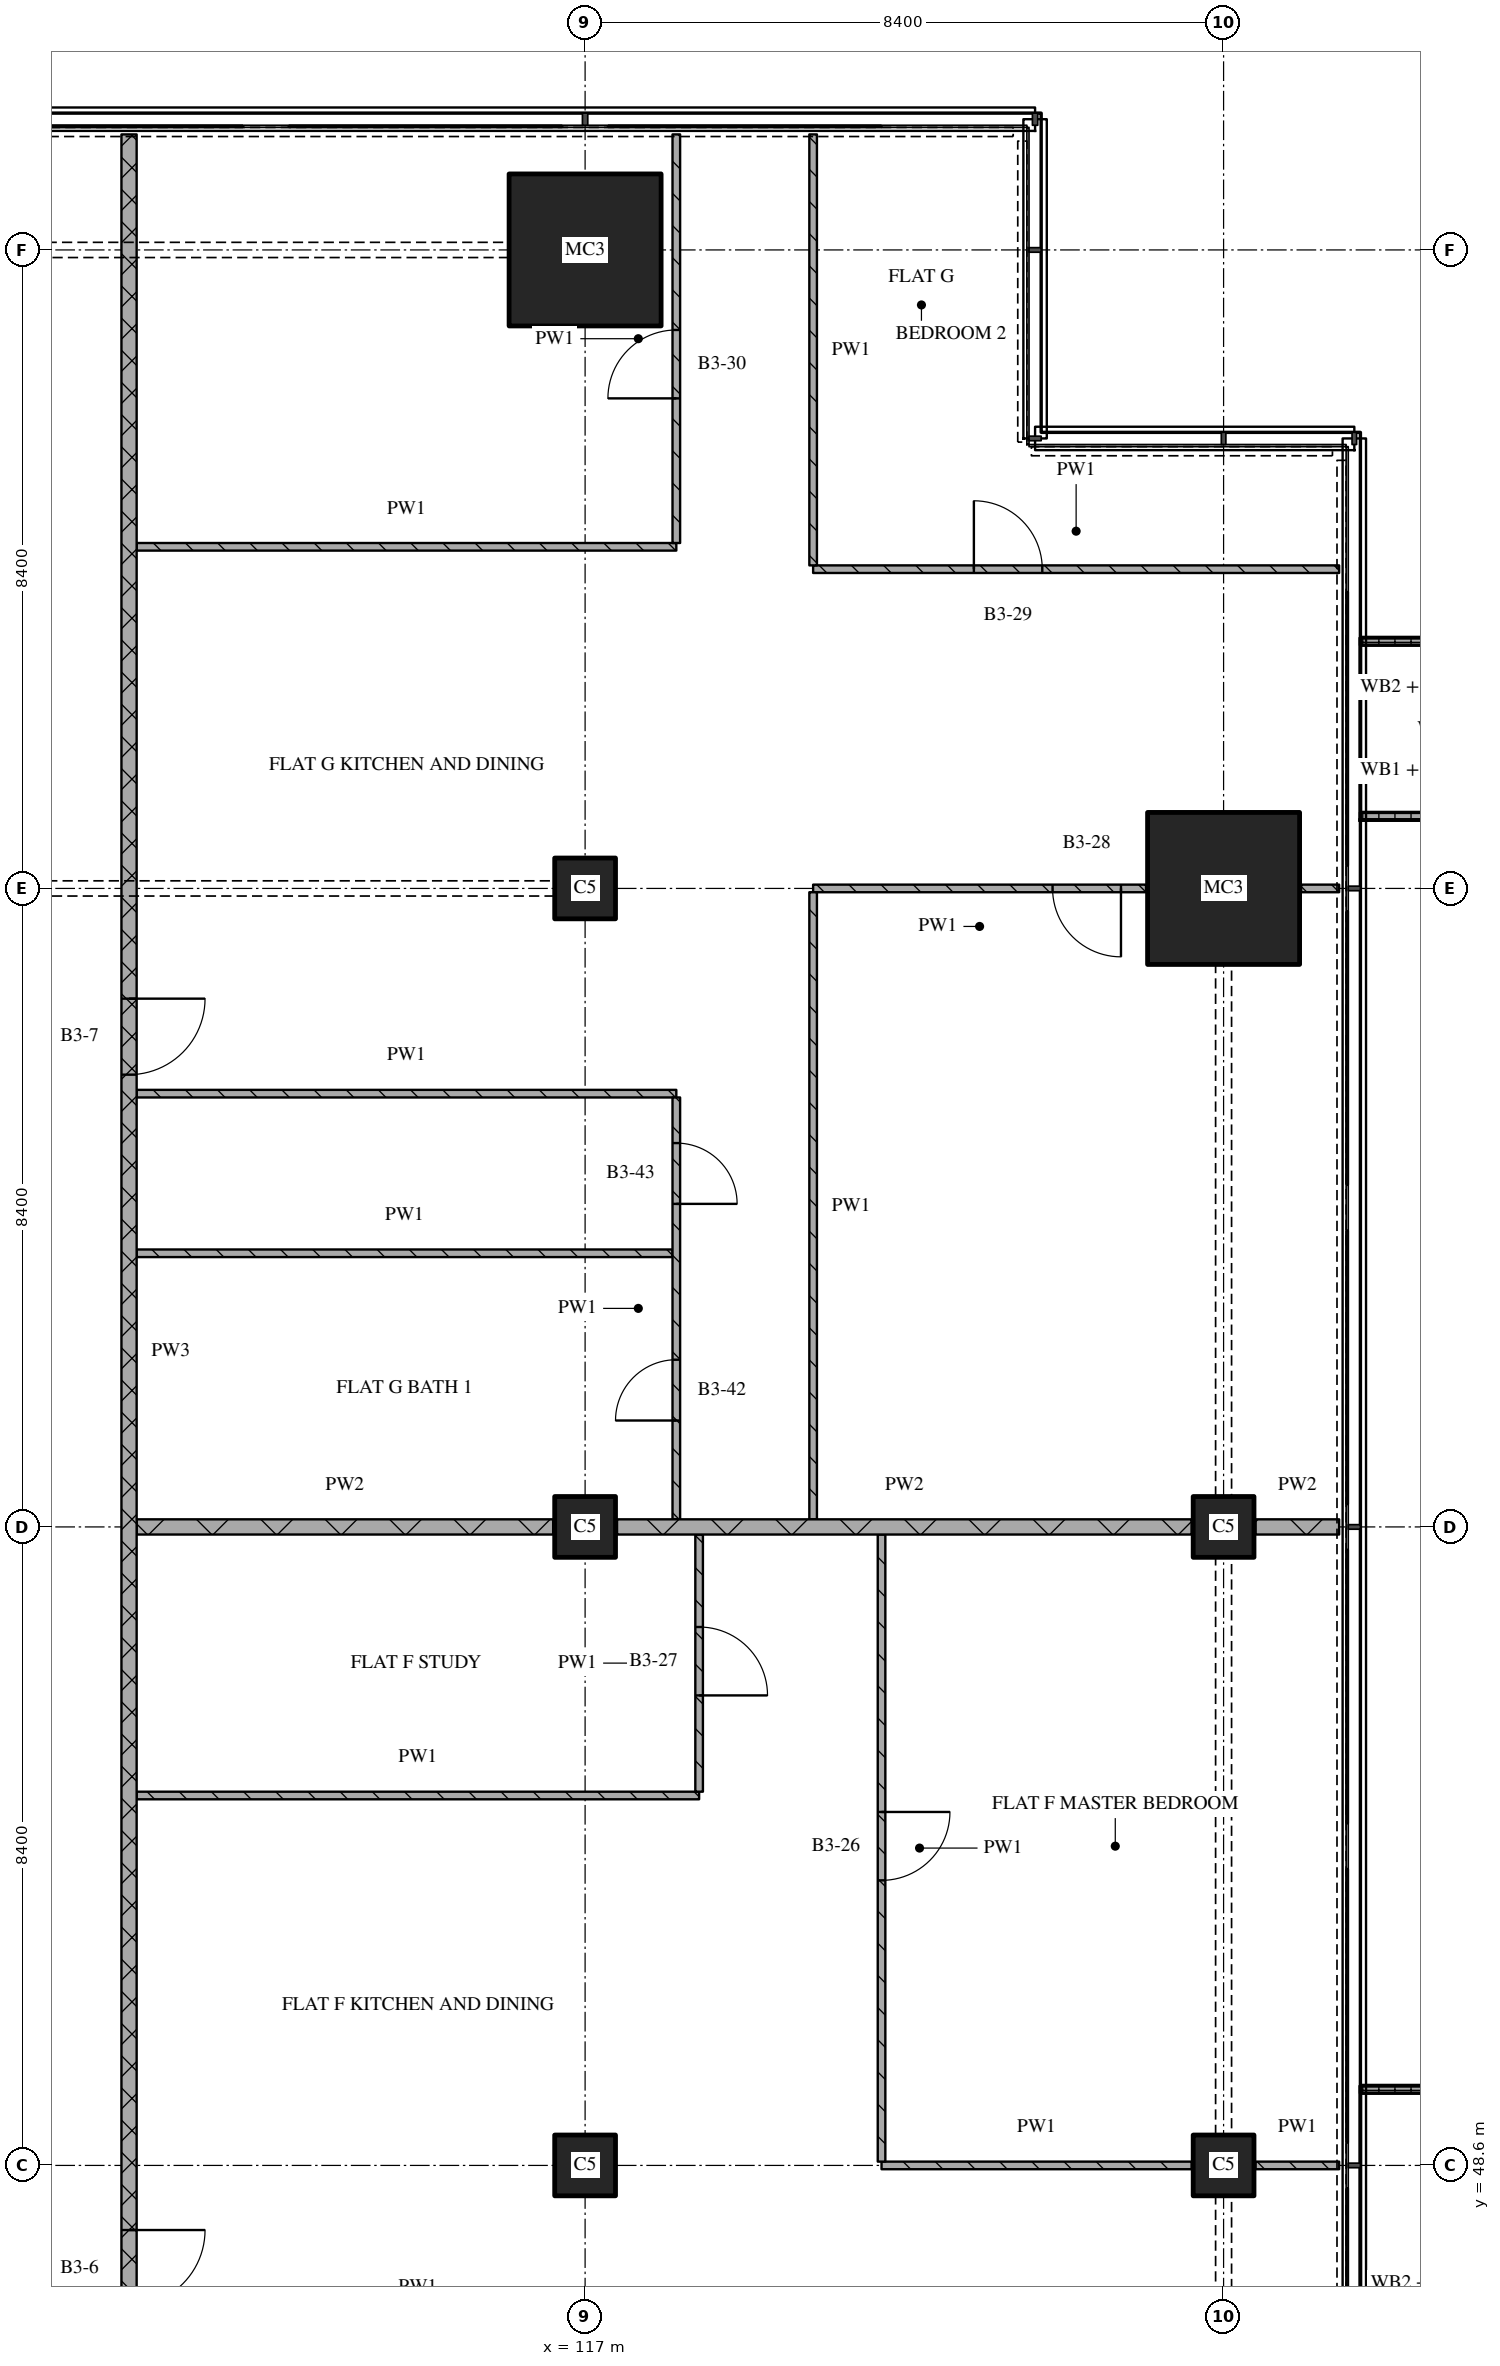
"""IFC4 building model, lengths in metres.
Left out: names, types, materials, properties, quantities, classifications, styles, units other than length and angle.
Written with IfcOpenShell. Run it as: python <this file> out.ifc"""

import sys

from ifc_helpers import new_model, si_unit, direction, frame, frame_2d, origin, origin_2d, place, context, subcontext, project, spatial, polyline, rectangle, outline, extrude, element, fill, save


model = new_model("IFC4")
c1 = context("Model", 3, precision=1e-05, world=origin(), true_north=direction((0.0, 1.0)))
c2 = subcontext(c1, "Body", "Model", "MODEL_VIEW")
j1 = project(units=[si_unit("LENGTHUNIT", "METRE"), si_unit("PLANEANGLEUNIT", "RADIAN")], contexts=[c1])
p1 = place(None, origin())
s1 = spatial("IfcSite", under=j1, at=p1, CompositionType="ELEMENT")
p2 = place(p1, origin())
s2 = spatial("IfcBuilding", under=s1, at=p2, CompositionType="ELEMENT")
p3 = place(p2, frame((0.0, 0.0, 124.05)))
s3 = spatial("IfcBuildingStorey", under=s2, at=p3, CompositionType="ELEMENT", Elevation=124.05)
for number, where, z_axis, x_axis in (
    (1, (117.0, 48.6, 0.0), (0.0, 0.0, 1.0), (1.0, 0.0, 0.0)),
    (2, (117.0, 57.0, 0.0), (0.0, 0.0, 1.0), (1.0, 0.0, 0.0)),
    (3, (117.0, 65.4, 0.0), (0.0, 0.0, 1.0), (1.0, 0.0, 0.0)),
):
    element("IfcColumn", number, at=place(p3, frame(where, z_axis=z_axis, x_axis=x_axis)), inside=s3, PredefinedType="COLUMN", context=c2, shape_type="SweptSolid", body=[
        extrude(rectangle(XDim=0.8, YDim=0.8, at=origin_2d()), origin(), (0.0, 0.0, 1.0), 3.6),
    ])
p4 = place(p3, frame((117.0, 73.8, 0.0), z_axis=(0.0, 0.0, 1.0), x_axis=(1.0, 0.0, 0.0)))
e4 = element("IfcColumn", 4, at=p4, inside=s3, PredefinedType="COLUMN", context=c2, shape_type="SweptSolid", body=[
    extrude(rectangle(XDim=2.0, YDim=2.0, at=origin_2d()), origin(), (0.0, 0.0, 1.0), 3.6),
])
for number, where, z_axis, x_axis in (
    (5, (125.4, 48.6, 0.0), (0.0, 0.0, 1.0), (1.0, 0.0, 0.0)),
    (6, (125.4, 57.0, 0.0), (0.0, 0.0, 1.0), (1.0, 0.0, 0.0)),
):
    element("IfcColumn", number, at=place(p3, frame(where, z_axis=z_axis, x_axis=x_axis)), inside=s3, PredefinedType="COLUMN", context=c2, shape_type="SweptSolid", body=[
        extrude(rectangle(XDim=0.8, YDim=0.8, at=origin_2d()), origin(), (0.0, 0.0, 1.0), 3.6),
    ])
p5 = place(p3, frame((125.4, 65.4, 0.0), z_axis=(0.0, 0.0, 1.0), x_axis=(1.0, 0.0, 0.0)))
e7 = element("IfcColumn", 7, at=p5, inside=s3, PredefinedType="COLUMN", context=c2, shape_type="SweptSolid", body=[
    extrude(rectangle(XDim=2.0, YDim=2.0, at=origin_2d()), origin(), (0.0, 0.0, 1.0), 3.6),
])
p6 = place(p3, origin())
e8 = element("IfcWall", 8, at=p6, inside=s3, PredefinedType="SOLIDWALL", context=c2, shape_type="SweptSolid", body=[
    extrude(outline(polyline([(127.2, 43.35), (127.2, 43.45), (128.967, 43.45), (128.967, 49.55), (127.2, 49.55), (127.2, 49.65), (129.067, 49.65), (129.067, 43.35), (127.2, 43.35)])), origin(), (0.0, 0.0, 1.0), 1.0),
])
p7 = place(p3, origin())
e9 = element("IfcWall", 9, at=p7, inside=s3, PredefinedType="SOLIDWALL", context=c2, shape_type="SweptSolid", body=[
    extrude(outline(polyline([(127.2, 66.3), (127.2, 66.4), (128.7, 66.4), (128.7, 68.6), (127.2, 68.6), (127.2, 68.7), (128.8, 68.7), (128.8, 66.3), (127.2, 66.3)])), origin(), (0.0, 0.0, 1.0), 1.0),
])
p8 = place(p3, frame((120.9, 48.6, 0.0), z_axis=(0.0, 0.0, 1.0), x_axis=(1.0, 0.0, 0.0)))
e10 = element("IfcWall", 10, at=p8, inside=s3, PredefinedType="PARTITIONING", context=c2, shape_type="SweptSolid", body=[
    extrude(rectangle(XDim=4.08, YDim=0.1, at=frame_2d((2.04, 0.0))), origin(), (0.0, 0.0, 1.0), 3.32),
])
p9 = place(p3, frame((125.82, 48.6, 0.0), z_axis=(0.0, 0.0, 1.0), x_axis=(1.0, 0.0, 0.0)))
e11 = element("IfcWall", 11, at=p9, inside=s3, PredefinedType="PARTITIONING", context=c2, shape_type="SweptSolid", body=[
    extrude(rectangle(XDim=1.1, YDim=0.1, at=frame_2d((0.55, 0.0))), origin(), (0.0, 0.0, 1.0), 3.32),
])
p10 = place(p3, frame((111.1, 53.467, 0.0), z_axis=(0.0, 0.0, 1.0), x_axis=(1.0, 0.0, 0.0)))
e12 = element("IfcWall", 12, at=p10, inside=s3, PredefinedType="PARTITIONING", context=c2, shape_type="SweptSolid", body=[
    extrude(rectangle(XDim=7.4, YDim=0.1, at=frame_2d((3.7, 0.0))), origin(), (0.0, 0.0, 1.0), 3.32),
])
p11 = place(p3, frame((111.1, 57.0, 0.0), z_axis=(0.0, 0.0, 1.0), x_axis=(1.0, 0.0, 0.0)))
e13 = element("IfcWall", 13, at=p11, inside=s3, PredefinedType="PARTITIONING", context=c2, shape_type="SweptSolid", body=[
    extrude(rectangle(XDim=5.48, YDim=0.2, at=frame_2d((2.74, 0.0))), origin(), (0.0, 0.0, 1.0), 3.32),
])
p12 = place(p3, frame((117.42, 57.0, 0.0), z_axis=(0.0, 0.0, 1.0), x_axis=(1.0, 0.0, 0.0)))
e14 = element("IfcWall", 14, at=p12, inside=s3, PredefinedType="PARTITIONING", context=c2, shape_type="SweptSolid", body=[
    extrude(rectangle(XDim=7.56, YDim=0.2, at=frame_2d((3.78, 0.0))), origin(), (0.0, 0.0, 1.0), 3.32),
])
p13 = place(p3, frame((125.82, 57.0, 0.0), z_axis=(0.0, 0.0, 1.0), x_axis=(1.0, 0.0, 0.0)))
e15 = element("IfcWall", 15, at=p13, inside=s3, PredefinedType="PARTITIONING", context=c2, shape_type="SweptSolid", body=[
    extrude(rectangle(XDim=1.1, YDim=0.2, at=frame_2d((0.55, 0.0))), origin(), (0.0, 0.0, 1.0), 3.32),
])
p14 = place(p3, frame((111.1, 60.6, 0.0), z_axis=(0.0, 0.0, 1.0), x_axis=(1.0, 0.0, 0.0)))
e16 = element("IfcWall", 16, at=p14, inside=s3, PredefinedType="PARTITIONING", context=c2, shape_type="SweptSolid", body=[
    extrude(rectangle(XDim=7.05, YDim=0.1, at=frame_2d((3.525, 0.0))), origin(), (0.0, 0.0, 1.0), 3.32),
])
p15 = place(p3, frame((111.1, 62.7, 0.0), z_axis=(0.0, 0.0, 1.0), x_axis=(1.0, 0.0, 0.0)))
e17 = element("IfcWall", 17, at=p15, inside=s3, PredefinedType="PARTITIONING", context=c2, shape_type="SweptSolid", body=[
    extrude(rectangle(XDim=7.1, YDim=0.1, at=frame_2d((3.55, 0.0))), origin(), (0.0, 0.0, 1.0), 3.32),
])
p16 = place(p3, frame((124.38, 65.4, 0.0), z_axis=(0.0, 0.0, 1.0), x_axis=(-1.0, 0.0, 0.0)))
e18 = element("IfcWall", 18, at=p16, inside=s3, PredefinedType="PARTITIONING", context=c2, shape_type="SweptSolid", body=[
    extrude(rectangle(XDim=4.38, YDim=0.1, at=frame_2d((2.19, 0.0))), origin(), (0.0, 0.0, 1.0), 3.32),
])
p17 = place(p16, frame((0.33, 0.0, 0.0)))
e19 = element("IfcOpeningElement", 19, at=p17, cuts=e18, PredefinedType="OPENING", context=c2, shape_type="SweptSolid", body=[
    extrude(rectangle(XDim=0.9, YDim=2.1, at=frame_2d((0.45, 1.05))), frame((0.0, 0.06, 0.0), z_axis=(0.0, -1.0, 0.0), x_axis=(1.0, 0.0, 0.0)), (0.0, 0.0, 1.0), 0.12),
])
p18 = place(p3, frame((126.42, 65.4, 0.0), z_axis=(0.0, 0.0, 1.0), x_axis=(1.0, 0.0, 0.0)))
e20 = element("IfcWall", 20, at=p18, inside=s3, PredefinedType="PARTITIONING", context=c2, shape_type="SweptSolid", body=[
    extrude(rectangle(XDim=0.5, YDim=0.1, at=frame_2d((0.25, 0.0))), origin(), (0.0, 0.0, 1.0), 3.32),
])
p19 = place(p3, frame((120.0, 69.6, 0.0), z_axis=(0.0, 0.0, 1.0), x_axis=(1.0, 0.0, 0.0)))
e21 = element("IfcWall", 21, at=p19, inside=s3, PredefinedType="PARTITIONING", context=c2, shape_type="SweptSolid", body=[
    extrude(rectangle(XDim=6.92, YDim=0.1, at=frame_2d((3.46, 0.0))), origin(), (0.0, 0.0, 1.0), 3.32),
])
p20 = place(p19, frame((2.115, 0.0, 0.0)))
e22 = element("IfcOpeningElement", 22, at=p20, cuts=e21, PredefinedType="OPENING", context=c2, shape_type="SweptSolid", body=[
    extrude(rectangle(XDim=0.9, YDim=2.1, at=frame_2d((0.45, 1.05))), frame((0.0, 0.06, 0.0), z_axis=(0.0, -1.0, 0.0), x_axis=(1.0, 0.0, 0.0)), (0.0, 0.0, 1.0), 0.12),
])
p21 = place(p3, frame((111.1, 69.894, 0.0), z_axis=(0.0, 0.0, 1.0), x_axis=(1.0, 0.0, 0.0)))
e23 = element("IfcWall", 23, at=p21, inside=s3, PredefinedType="PARTITIONING", context=c2, shape_type="SweptSolid", body=[
    extrude(rectangle(XDim=7.1, YDim=0.1, at=frame_2d((3.55, 0.0))), origin(), (0.0, 0.0, 1.0), 3.32),
])
p22 = place(p3, frame((111.0, 75.32, 0.0), z_axis=(0.0, 0.0, 1.0), x_axis=(0.0, -1.0, 0.0)))
e24 = element("IfcWall", 24, at=p22, inside=s3, PredefinedType="PARTITIONING", context=c2, shape_type="SweptSolid", body=[
    extrude(rectangle(XDim=32.02, YDim=0.2, at=frame_2d((16.01, 0.0))), origin(), (0.0, 0.0, 1.0), 3.32),
])
p23 = place(p22, frame((11.37, 0.0, 0.0)))
e25 = element("IfcOpeningElement", 25, at=p23, cuts=e24, PredefinedType="OPENING", context=c2, shape_type="SweptSolid", body=[
    extrude(rectangle(XDim=1.0, YDim=2.1, at=frame_2d((0.5, 1.05))), frame((0.0, 0.11, 0.0), z_axis=(0.0, -1.0, 0.0), x_axis=(1.0, 0.0, 0.0)), (0.0, 0.0, 1.0), 0.22),
])
p24 = place(p22, frame((27.57, 0.0, 0.0)))
e26 = element("IfcOpeningElement", 26, at=p24, cuts=e24, PredefinedType="OPENING", context=c2, shape_type="SweptSolid", body=[
    extrude(rectangle(XDim=1.0, YDim=2.1, at=frame_2d((0.5, 1.05))), frame((0.0, 0.11, 0.0), z_axis=(0.0, -1.0, 0.0), x_axis=(1.0, 0.0, 0.0)), (0.0, 0.0, 1.0), 0.22),
])
p25 = place(p3, frame((118.2, 57.1, 0.0), z_axis=(0.0, 0.0, 1.0), x_axis=(0.0, 1.0, 0.0)))
e27 = element("IfcWall", 27, at=p25, inside=s3, PredefinedType="PARTITIONING", context=c2, shape_type="SweptSolid", body=[
    extrude(rectangle(XDim=5.55, YDim=0.1, at=frame_2d((2.775, 0.0))), origin(), (0.0, 0.0, 1.0), 3.32),
])
p26 = place(p25, frame((1.3, 0.0, 0.0)))
e28 = element("IfcOpeningElement", 28, at=p26, cuts=e27, PredefinedType="OPENING", context=c2, shape_type="SweptSolid", body=[
    extrude(rectangle(XDim=0.8, YDim=2.1, at=frame_2d((0.4, 1.05))), frame((0.0, 0.06, 0.0), z_axis=(0.0, -1.0, 0.0), x_axis=(1.0, 0.0, 0.0)), (0.0, 0.0, 1.0), 0.12),
])
p27 = place(p25, frame((4.15, 0.0, 0.0)))
e29 = element("IfcOpeningElement", 29, at=p27, cuts=e27, PredefinedType="OPENING", context=c2, shape_type="SweptSolid", body=[
    extrude(rectangle(XDim=0.8, YDim=2.1, at=frame_2d((0.4, 1.05))), frame((0.0, 0.06, 0.0), z_axis=(0.0, -1.0, 0.0), x_axis=(1.0, 0.0, 0.0)), (0.0, 0.0, 1.0), 0.12),
])
p28 = place(p3, frame((118.2, 69.944, 0.0), z_axis=(0.0, 0.0, 1.0), x_axis=(0.0, 1.0, 0.0)))
e30 = element("IfcWall", 30, at=p28, inside=s3, PredefinedType="PARTITIONING", context=c2, shape_type="SweptSolid", body=[
    extrude(rectangle(XDim=5.376, YDim=0.1, at=frame_2d((2.688, 0.0))), origin(), (0.0, 0.0, 1.0), 3.32),
])
p29 = place(p28, frame((1.903, 0.0, 0.0)))
e31 = element("IfcOpeningElement", 31, at=p29, cuts=e30, PredefinedType="OPENING", context=c2, shape_type="SweptSolid", body=[
    extrude(rectangle(XDim=0.9, YDim=2.1, at=frame_2d((0.45, 1.05))), frame((0.0, 0.06, 0.0), z_axis=(0.0, -1.0, 0.0), x_axis=(1.0, 0.0, 0.0)), (0.0, 0.0, 1.0), 0.12),
])
p30 = place(p3, frame((118.5, 53.517, 0.0), z_axis=(0.0, 0.0, 1.0), x_axis=(0.0, 1.0, 0.0)))
e32 = element("IfcWall", 32, at=p30, inside=s3, PredefinedType="PARTITIONING", context=c2, shape_type="SweptSolid", body=[
    extrude(rectangle(XDim=3.383, YDim=0.1, at=frame_2d((1.692, 0.0))), origin(), (0.0, 0.0, 1.0), 3.32),
])
p31 = place(p30, frame((1.267, 0.0, 0.0)))
e33 = element("IfcOpeningElement", 33, at=p31, cuts=e32, PredefinedType="OPENING", context=c2, shape_type="SweptSolid", body=[
    extrude(rectangle(XDim=0.9, YDim=2.1, at=frame_2d((0.45, 1.05))), frame((0.0, 0.06, 0.0), z_axis=(0.0, -1.0, 0.0), x_axis=(1.0, 0.0, 0.0)), (0.0, 0.0, 1.0), 0.12),
])
p32 = place(p3, frame((120.0, 65.35, 0.0), z_axis=(0.0, 0.0, 1.0), x_axis=(0.0, -1.0, 0.0)))
e34 = element("IfcWall", 34, at=p32, inside=s3, PredefinedType="PARTITIONING", context=c2, shape_type="SweptSolid", body=[
    extrude(rectangle(XDim=8.25, YDim=0.1, at=frame_2d((4.125, 0.0))), origin(), (0.0, 0.0, 1.0), 3.32),
])
p33 = place(p3, frame((120.0, 75.32, 0.0), z_axis=(0.0, 0.0, 1.0), x_axis=(0.0, -1.0, 0.0)))
e35 = element("IfcWall", 35, at=p33, inside=s3, PredefinedType="PARTITIONING", context=c2, shape_type="SweptSolid", body=[
    extrude(rectangle(XDim=5.67, YDim=0.1, at=frame_2d((2.835, 0.0))), origin(), (0.0, 0.0, 1.0), 3.32),
])
p34 = place(p3, frame((120.9, 56.9, 0.0), z_axis=(0.0, 0.0, 1.0), x_axis=(0.0, -1.0, 0.0)))
e36 = element("IfcWall", 36, at=p34, inside=s3, PredefinedType="PARTITIONING", context=c2, shape_type="SweptSolid", body=[
    extrude(rectangle(XDim=8.25, YDim=0.1, at=frame_2d((4.125, 0.0))), origin(), (0.0, 0.0, 1.0), 3.32),
])
p35 = place(p34, frame((3.65, 0.0, 0.0)))
e37 = element("IfcOpeningElement", 37, at=p35, cuts=e36, PredefinedType="OPENING", context=c2, shape_type="SweptSolid", body=[
    extrude(rectangle(XDim=0.9, YDim=2.1, at=frame_2d((0.45, 1.05))), frame((0.0, 0.06, 0.0), z_axis=(0.0, -1.0, 0.0), x_axis=(1.0, 0.0, 0.0)), (0.0, 0.0, 1.0), 0.12),
])
p36 = place(p17, origin())
e38 = element("IfcDoor", 38, at=p36, inside=s3, OperationType="SINGLE_SWING_LEFT", PredefinedType="DOOR", context=c2, shape_type="SweptSolid", body=[
    extrude(rectangle(XDim=0.9, YDim=2.1, at=frame_2d((0.45, 1.05))), frame((0.0, 0.025, 0.0), z_axis=(0.0, -1.0, 0.0), x_axis=(1.0, 0.0, 0.0)), (0.0, 0.0, 1.0), 0.05),
])
fill(e19, e38)
p37 = place(p20, origin())
e39 = element("IfcDoor", 39, at=p37, inside=s3, OperationType="SINGLE_SWING_LEFT", PredefinedType="DOOR", context=c2, shape_type="SweptSolid", body=[
    extrude(rectangle(XDim=0.9, YDim=2.1, at=frame_2d((0.45, 1.05))), frame((0.0, 0.025, 0.0), z_axis=(0.0, -1.0, 0.0), x_axis=(1.0, 0.0, 0.0)), (0.0, 0.0, 1.0), 0.05),
])
fill(e22, e39)
p38 = place(p23, origin())
e40 = element("IfcDoor", 40, at=p38, inside=s3, OperationType="SINGLE_SWING_LEFT", PredefinedType="DOOR", context=c2, shape_type="SweptSolid", body=[
    extrude(rectangle(XDim=1.0, YDim=2.1, at=frame_2d((0.5, 1.05))), frame((0.0, 0.025, 0.0), z_axis=(0.0, -1.0, 0.0), x_axis=(1.0, 0.0, 0.0)), (0.0, 0.0, 1.0), 0.05),
])
fill(e25, e40)
p39 = place(p24, origin())
e41 = element("IfcDoor", 41, at=p39, inside=s3, OperationType="SINGLE_SWING_LEFT", PredefinedType="DOOR", context=c2, shape_type="SweptSolid", body=[
    extrude(rectangle(XDim=1.0, YDim=2.1, at=frame_2d((0.5, 1.05))), frame((0.0, 0.025, 0.0), z_axis=(0.0, -1.0, 0.0), x_axis=(1.0, 0.0, 0.0)), (0.0, 0.0, 1.0), 0.05),
])
fill(e26, e41)
p40 = place(p26, origin())
e42 = element("IfcDoor", 42, at=p40, inside=s3, OperationType="SINGLE_SWING_LEFT", PredefinedType="DOOR", context=c2, shape_type="SweptSolid", body=[
    extrude(rectangle(XDim=0.8, YDim=2.1, at=frame_2d((0.4, 1.05))), frame((0.0, 0.025, 0.0), z_axis=(0.0, -1.0, 0.0), x_axis=(1.0, 0.0, 0.0)), (0.0, 0.0, 1.0), 0.05),
])
fill(e28, e42)
p41 = place(p27, origin())
e43 = element("IfcDoor", 43, at=p41, inside=s3, OperationType="SINGLE_SWING_RIGHT", PredefinedType="DOOR", context=c2, shape_type="SweptSolid", body=[
    extrude(rectangle(XDim=0.8, YDim=2.1, at=frame_2d((0.4, 1.05))), frame((0.0, 0.025, 0.0), z_axis=(0.0, -1.0, 0.0), x_axis=(1.0, 0.0, 0.0)), (0.0, 0.0, 1.0), 0.05),
])
fill(e29, e43)
p42 = place(p29, origin())
e44 = element("IfcDoor", 44, at=p42, inside=s3, OperationType="SINGLE_SWING_LEFT", PredefinedType="DOOR", context=c2, shape_type="SweptSolid", body=[
    extrude(rectangle(XDim=0.9, YDim=2.1, at=frame_2d((0.45, 1.05))), frame((0.0, 0.025, 0.0), z_axis=(0.0, -1.0, 0.0), x_axis=(1.0, 0.0, 0.0)), (0.0, 0.0, 1.0), 0.05),
])
fill(e31, e44)
p43 = place(p31, origin())
e45 = element("IfcDoor", 45, at=p43, inside=s3, OperationType="SINGLE_SWING_RIGHT", PredefinedType="DOOR", context=c2, shape_type="SweptSolid", body=[
    extrude(rectangle(XDim=0.9, YDim=2.1, at=frame_2d((0.45, 1.05))), frame((0.0, 0.025, 0.0), z_axis=(0.0, -1.0, 0.0), x_axis=(1.0, 0.0, 0.0)), (0.0, 0.0, 1.0), 0.05),
])
fill(e33, e45)
p44 = place(p35, origin())
e46 = element("IfcDoor", 46, at=p44, inside=s3, OperationType="SINGLE_SWING_LEFT", PredefinedType="DOOR", context=c2, shape_type="SweptSolid", body=[
    extrude(rectangle(XDim=0.9, YDim=2.1, at=frame_2d((0.45, 1.05))), frame((0.0, 0.025, 0.0), z_axis=(0.0, -1.0, 0.0), x_axis=(1.0, 0.0, 0.0)), (0.0, 0.0, 1.0), 0.05),
])
fill(e37, e46)
save(model, sys.argv[1])
